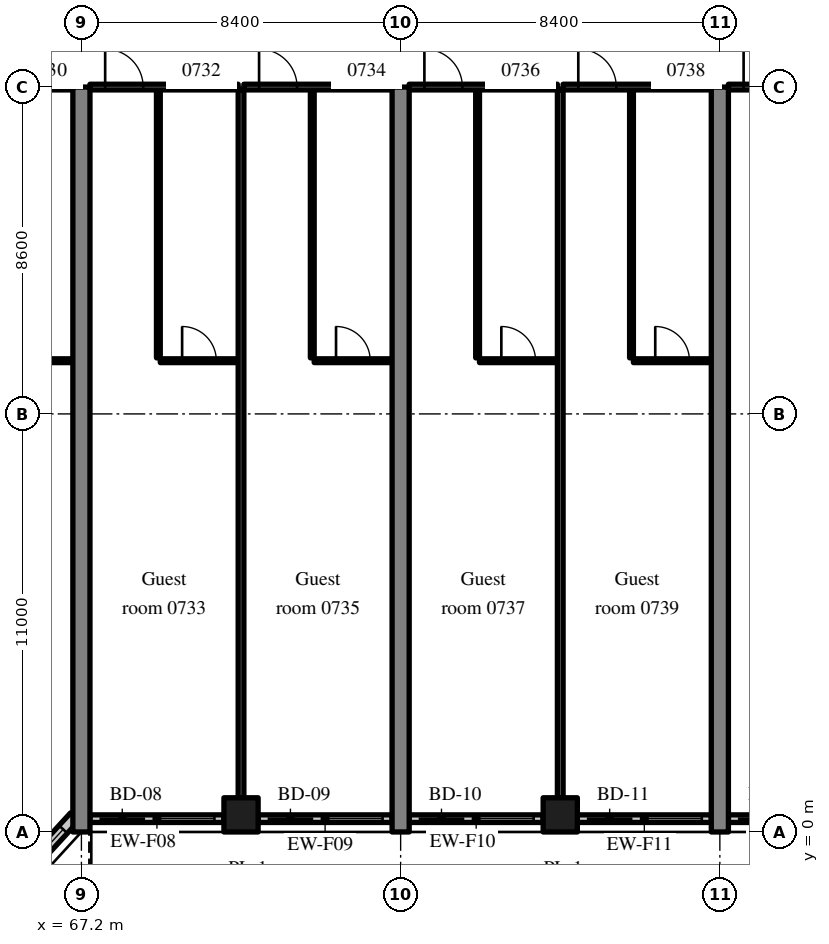
"""IFC4 building model, lengths in metres.
Left out: names, types, materials, properties, quantities, classifications, styles, units other than length and angle.
Written with IfcOpenShell. Run it as: python <this file> out.ifc"""

import sys

from ifc_helpers import new_model, si_unit, direction, frame, frame_2d, origin, origin_2d, place, context, subcontext, project, spatial, rectangle, extrude, source, transform, mapped, element, fill, save


model = new_model("IFC4")
c1 = context("Model", 3, precision=1e-05, world=origin(), true_north=direction((0.0, 1.0)))
c2 = subcontext(c1, "Body", "Model", "MODEL_VIEW")
j1 = project(units=[si_unit("LENGTHUNIT", "METRE"), si_unit("PLANEANGLEUNIT", "RADIAN")], contexts=[c1])
p1 = place(None, origin())
s1 = spatial("IfcSite", under=j1, at=p1, CompositionType="ELEMENT")
p2 = place(p1, origin())
s2 = spatial("IfcBuilding", under=s1, at=p2, CompositionType="ELEMENT")
p3 = place(p2, frame((0.0, 0.0, 35.4)))
s3 = spatial("IfcBuildingStorey", under=s2, at=p3, CompositionType="ELEMENT", Elevation=35.4)
m1 = source(origin(), c2, "Body", "SweptSolid", [
    extrude(rectangle(XDim=19.6, YDim=0.45, at=frame_2d((9.8, 0.0))), origin(), (0.0, 0.0, 1.0), 3.52),
])
for number, where, z_axis, x_axis in (
    (1, (67.2, 0.0, 0.0), (0.0, 0.0, 1.0), (0.0, 1.0, 0.0)),
    (2, (75.6, 0.0, 0.0), (0.0, 0.0, 1.0), (0.0, 1.0, 0.0)),
    (3, (84.0, 0.0, 0.0), (0.0, 0.0, 1.0), (0.0, 1.0, 0.0)),
):
    element("IfcWall", number, at=place(p3, frame(where, z_axis=z_axis, x_axis=x_axis)), inside=s3, PredefinedType="SHEAR", context=c2, shape_type="MappedRepresentation", body=[
        mapped(m1, transform((0.0, 0.0, 0.0), scale=1.0)),
    ])
m2 = source(origin(), c2, "Body", "SweptSolid", [
    extrude(rectangle(XDim=0.9, YDim=0.9, at=origin_2d()), origin(), (0.0, 0.0, 1.0), 3.52),
])
for number, where, z_axis, x_axis in (
    (4, (71.4, 0.45, 0.0), (0.0, 0.0, 1.0), (1.0, 0.0, 0.0)),
    (5, (79.8, 0.45, 0.0), (0.0, 0.0, 1.0), (1.0, 0.0, 0.0)),
):
    element("IfcColumn", number, at=place(p3, frame(where, z_axis=z_axis, x_axis=x_axis)), inside=s3, PredefinedType="COLUMN", context=c2, shape_type="MappedRepresentation", body=[
        mapped(m2, transform((0.0, 0.0, 0.0), scale=1.0)),
    ])
m3 = source(origin(), c2, "Body", "SweptSolid", [
    extrude(rectangle(XDim=2.398, YDim=0.3, at=frame_2d((1.199, 0.0))), origin(), (0.0, 0.0, 1.0), 3.52),
])
p4 = place(p3, frame((65.404, -1.369, 0.0), z_axis=(0.0, 0.0, 1.0), x_axis=(0.675374189419, 0.737475222815, 0.0)))
e6 = element("IfcWall", 6, at=p4, inside=s3, PredefinedType="SOLIDWALL", context=c2, shape_type="MappedRepresentation", body=[
    mapped(m3, transform((0.0, 0.0, 0.0), scale=1.0)),
])
m4 = source(origin(), c2, "Body", "SweptSolid", [
    extrude(rectangle(XDim=1.5, YDim=2.0, at=frame_2d((0.75, 1.0))), frame((0.0, 0.16, 0.0), z_axis=(0.0, -1.0, 0.0), x_axis=(1.0, 0.0, 0.0)), (0.0, 0.0, 1.0), 0.32),
])
p5 = place(p4, frame((0.449, 0.0, 0.9)))
e7 = element("IfcOpeningElement", 7, at=p5, cuts=e6, PredefinedType="OPENING", context=c2, shape_type="MappedRepresentation", body=[
    mapped(m4, transform((0.0, 0.0, 0.0), scale=1.0)),
])
m5 = source(origin(), c2, "Body", "SweptSolid", [
    extrude(rectangle(XDim=3.525, YDim=0.2, at=frame_2d((1.762, 0.0))), origin(), (0.0, 0.0, 1.0), 2.77),
])
p6 = place(p3, frame((67.425, 0.35, 0.0), z_axis=(0.0, 0.0, 1.0), x_axis=(1.0, 0.0, 0.0)))
e8 = element("IfcWall", 8, at=p6, inside=s3, PredefinedType="SOLIDWALL", context=c2, shape_type="MappedRepresentation", body=[
    mapped(m5, transform((0.0, 0.0, 0.0), scale=1.0)),
])
m6 = source(origin(), c2, "Body", "SweptSolid", [
    extrude(rectangle(XDim=1.2, YDim=2.4, at=frame_2d((0.6, 1.2))), frame((0.0, 0.11, 0.0), z_axis=(0.0, -1.0, 0.0), x_axis=(1.0, 0.0, 0.0)), (0.0, 0.0, 1.0), 0.22),
])
p7 = place(p6, frame((0.25, 0.0, 0.0)))
e9 = element("IfcOpeningElement", 9, at=p7, cuts=e8, PredefinedType="OPENING", context=c2, shape_type="MappedRepresentation", body=[
    mapped(m6, transform((0.0, 0.0, 0.0), scale=1.0)),
])
m7 = source(origin(), c2, "Body", "SweptSolid", [
    extrude(rectangle(XDim=1.5, YDim=1.5, at=frame_2d((0.75, 0.75))), frame((0.0, 0.11, 0.0), z_axis=(0.0, -1.0, 0.0), x_axis=(1.0, 0.0, 0.0)), (0.0, 0.0, 1.0), 0.22),
])
p8 = place(p6, frame((1.775, 0.0, 0.9)))
e10 = element("IfcOpeningElement", 10, at=p8, cuts=e8, PredefinedType="OPENING", context=c2, shape_type="MappedRepresentation", body=[
    mapped(m7, transform((0.0, 0.0, 0.0), scale=1.0)),
])
p9 = place(p3, frame((71.85, 0.35, 0.0), z_axis=(0.0, 0.0, 1.0), x_axis=(1.0, 0.0, 0.0)))
e11 = element("IfcWall", 11, at=p9, inside=s3, PredefinedType="SOLIDWALL", context=c2, shape_type="MappedRepresentation", body=[
    mapped(m5, transform((0.0, 0.0, 0.0), scale=1.0)),
])
p10 = place(p9, frame((0.25, 0.0, 0.0)))
e12 = element("IfcOpeningElement", 12, at=p10, cuts=e11, PredefinedType="OPENING", context=c2, shape_type="MappedRepresentation", body=[
    mapped(m6, transform((0.0, 0.0, 0.0), scale=1.0)),
])
p11 = place(p9, frame((1.775, 0.0, 0.9)))
e13 = element("IfcOpeningElement", 13, at=p11, cuts=e11, PredefinedType="OPENING", context=c2, shape_type="MappedRepresentation", body=[
    mapped(m7, transform((0.0, 0.0, 0.0), scale=1.0)),
])
m8 = source(origin(), c2, "Body", "SweptSolid", [
    extrude(rectangle(XDim=3.525, YDim=0.2, at=frame_2d((1.763, 0.0))), origin(), (0.0, 0.0, 1.0), 2.77),
])
p12 = place(p3, frame((75.825, 0.35, 0.0), z_axis=(0.0, 0.0, 1.0), x_axis=(1.0, 0.0, 0.0)))
e14 = element("IfcWall", 14, at=p12, inside=s3, PredefinedType="SOLIDWALL", context=c2, shape_type="MappedRepresentation", body=[
    mapped(m8, transform((0.0, 0.0, 0.0), scale=1.0)),
])
p13 = place(p12, frame((0.25, 0.0, 0.0)))
e15 = element("IfcOpeningElement", 15, at=p13, cuts=e14, PredefinedType="OPENING", context=c2, shape_type="MappedRepresentation", body=[
    mapped(m6, transform((0.0, 0.0, 0.0), scale=1.0)),
])
p14 = place(p12, frame((1.775, 0.0, 0.9)))
e16 = element("IfcOpeningElement", 16, at=p14, cuts=e14, PredefinedType="OPENING", context=c2, shape_type="MappedRepresentation", body=[
    mapped(m7, transform((0.0, 0.0, 0.0), scale=1.0)),
])
p15 = place(p3, frame((80.25, 0.35, 0.0), z_axis=(0.0, 0.0, 1.0), x_axis=(1.0, 0.0, 0.0)))
e17 = element("IfcWall", 17, at=p15, inside=s3, PredefinedType="SOLIDWALL", context=c2, shape_type="MappedRepresentation", body=[
    mapped(m5, transform((0.0, 0.0, 0.0), scale=1.0)),
])
p16 = place(p15, frame((0.25, 0.0, 0.0)))
e18 = element("IfcOpeningElement", 18, at=p16, cuts=e17, PredefinedType="OPENING", context=c2, shape_type="MappedRepresentation", body=[
    mapped(m6, transform((0.0, 0.0, 0.0), scale=1.0)),
])
p17 = place(p15, frame((1.775, 0.0, 0.9)))
e19 = element("IfcOpeningElement", 19, at=p17, cuts=e17, PredefinedType="OPENING", context=c2, shape_type="MappedRepresentation", body=[
    mapped(m7, transform((0.0, 0.0, 0.0), scale=1.0)),
])
p18 = place(p3, frame((84.225, 0.35, 0.0), z_axis=(0.0, 0.0, 1.0), x_axis=(1.0, 0.0, 0.0)))
e20 = element("IfcWall", 20, at=p18, inside=s3, PredefinedType="SOLIDWALL", context=c2, shape_type="MappedRepresentation", body=[
    mapped(m5, transform((0.0, 0.0, 0.0), scale=1.0)),
])
p19 = place(p18, frame((0.25, 0.0, 0.0)))
e21 = element("IfcOpeningElement", 21, at=p19, cuts=e20, PredefinedType="OPENING", context=c2, shape_type="MappedRepresentation", body=[
    mapped(m6, transform((0.0, 0.0, 0.0), scale=1.0)),
])
p20 = place(p18, frame((1.775, 0.0, 0.9)))
e22 = element("IfcOpeningElement", 22, at=p20, cuts=e20, PredefinedType="OPENING", context=c2, shape_type="MappedRepresentation", body=[
    mapped(m7, transform((0.0, 0.0, 0.0), scale=1.0)),
])
m9 = source(origin(), c2, "Body", "SweptSolid", [
    extrude(rectangle(XDim=2.05, YDim=0.1, at=frame_2d((1.025, 0.0))), origin(), (0.0, 0.0, 1.0), 3.52),
])
p21 = place(p3, frame((64.925, 12.4, 0.0), z_axis=(0.0, 0.0, 1.0), x_axis=(1.0, 0.0, 0.0)))
e23 = element("IfcWall", 23, at=p21, inside=s3, PredefinedType="PARTITIONING", context=c2, shape_type="MappedRepresentation", body=[
    mapped(m9, transform((0.0, 0.0, 0.0), scale=1.0)),
])
m10 = source(origin(), c2, "Body", "SweptSolid", [
    extrude(rectangle(XDim=0.9, YDim=2.1, at=frame_2d((0.45, 1.05))), frame((0.0, 0.06, 0.0), z_axis=(0.0, -1.0, 0.0), x_axis=(1.0, 0.0, 0.0)), (0.0, 0.0, 1.0), 0.12),
])
p22 = place(p21, frame((0.575, 0.0, 0.0)))
e24 = element("IfcOpeningElement", 24, at=p22, cuts=e23, PredefinedType="OPENING", context=c2, shape_type="MappedRepresentation", body=[
    mapped(m10, transform((0.0, 0.0, 0.0), scale=1.0)),
])
m11 = source(origin(), c2, "Body", "SweptSolid", [
    extrude(rectangle(XDim=3.9, YDim=0.15, at=frame_2d((1.95, 0.0))), origin(), (0.0, 0.0, 1.0), 2.82),
])
p23 = place(p3, frame((63.075, 19.6, 0.0), z_axis=(0.0, 0.0, 1.0), x_axis=(1.0, 0.0, 0.0)))
e25 = element("IfcWall", 25, at=p23, inside=s3, PredefinedType="PARTITIONING", context=c2, shape_type="MappedRepresentation", body=[
    mapped(m11, transform((0.0, 0.0, 0.0), scale=1.0)),
])
m12 = source(origin(), c2, "Body", "SweptSolid", [
    extrude(rectangle(XDim=1.0, YDim=2.1, at=frame_2d((0.5, 1.05))), frame((0.0, 0.085, 0.0), z_axis=(0.0, -1.0, 0.0), x_axis=(1.0, 0.0, 0.0)), (0.0, 0.0, 1.0), 0.17),
])
p24 = place(p23, frame((0.4, 0.0, 0.0)))
e26 = element("IfcOpeningElement", 26, at=p24, cuts=e25, PredefinedType="OPENING", context=c2, shape_type="MappedRepresentation", body=[
    mapped(m12, transform((0.0, 0.0, 0.0), scale=1.0)),
])
m13 = source(origin(), c2, "Body", "SweptSolid", [
    extrude(rectangle(XDim=7.05, YDim=0.1, at=frame_2d((3.525, 0.0))), origin(), (0.0, 0.0, 1.0), 3.52),
])
p25 = place(p3, frame((69.225, 12.475, 0.0), z_axis=(0.0, 0.0, 1.0), x_axis=(0.0, 1.0, 0.0)))
e27 = element("IfcWall", 27, at=p25, inside=s3, PredefinedType="PARTITIONING", context=c2, shape_type="MappedRepresentation", body=[
    mapped(m13, transform((0.0, 0.0, 0.0), scale=1.0)),
])
p26 = place(p3, frame((69.275, 12.4, 0.0), z_axis=(0.0, 0.0, 1.0), x_axis=(1.0, 0.0, 0.0)))
e28 = element("IfcWall", 28, at=p26, inside=s3, PredefinedType="PARTITIONING", context=c2, shape_type="MappedRepresentation", body=[
    mapped(m9, transform((0.0, 0.0, 0.0), scale=1.0)),
])
p27 = place(p26, frame((0.575, 0.0, 0.0)))
e29 = element("IfcOpeningElement", 29, at=p27, cuts=e28, PredefinedType="OPENING", context=c2, shape_type="MappedRepresentation", body=[
    mapped(m10, transform((0.0, 0.0, 0.0), scale=1.0)),
])
m14 = source(origin(), c2, "Body", "SweptSolid", [
    extrude(rectangle(XDim=3.9, YDim=0.15, at=frame_2d((1.95, 0.0))), origin(), (0.0, 0.0, 1.0), 2.82),
])
p28 = place(p3, frame((67.425, 19.6, 0.0), z_axis=(0.0, 0.0, 1.0), x_axis=(1.0, 0.0, 0.0)))
e30 = element("IfcWall", 30, at=p28, inside=s3, PredefinedType="PARTITIONING", context=c2, shape_type="MappedRepresentation", body=[
    mapped(m14, transform((0.0, 0.0, 0.0), scale=1.0)),
])
p29 = place(p28, frame((0.4, 0.0, 0.0)))
e31 = element("IfcOpeningElement", 31, at=p29, cuts=e30, PredefinedType="OPENING", context=c2, shape_type="MappedRepresentation", body=[
    mapped(m12, transform((0.0, 0.0, 0.0), scale=1.0)),
])
p30 = place(p3, frame((73.275, 12.475, 0.0), z_axis=(0.0, 0.0, 1.0), x_axis=(0.0, 1.0, 0.0)))
e32 = element("IfcWall", 32, at=p30, inside=s3, PredefinedType="PARTITIONING", context=c2, shape_type="MappedRepresentation", body=[
    mapped(m13, transform((0.0, 0.0, 0.0), scale=1.0)),
])
p31 = place(p3, frame((73.325, 12.4, 0.0), z_axis=(0.0, 0.0, 1.0), x_axis=(1.0, 0.0, 0.0)))
e33 = element("IfcWall", 33, at=p31, inside=s3, PredefinedType="PARTITIONING", context=c2, shape_type="MappedRepresentation", body=[
    mapped(m9, transform((0.0, 0.0, 0.0), scale=1.0)),
])
p32 = place(p31, frame((0.575, 0.0, 0.0)))
e34 = element("IfcOpeningElement", 34, at=p32, cuts=e33, PredefinedType="OPENING", context=c2, shape_type="MappedRepresentation", body=[
    mapped(m10, transform((0.0, 0.0, 0.0), scale=1.0)),
])
p33 = place(p3, frame((71.475, 19.6, 0.0), z_axis=(0.0, 0.0, 1.0), x_axis=(1.0, 0.0, 0.0)))
e35 = element("IfcWall", 35, at=p33, inside=s3, PredefinedType="PARTITIONING", context=c2, shape_type="MappedRepresentation", body=[
    mapped(m14, transform((0.0, 0.0, 0.0), scale=1.0)),
])
p34 = place(p33, frame((0.4, 0.0, 0.0)))
e36 = element("IfcOpeningElement", 36, at=p34, cuts=e35, PredefinedType="OPENING", context=c2, shape_type="MappedRepresentation", body=[
    mapped(m12, transform((0.0, 0.0, 0.0), scale=1.0)),
])
m15 = source(origin(), c2, "Body", "SweptSolid", [
    extrude(rectangle(XDim=18.625, YDim=0.15, at=frame_2d((9.312, 0.0))), origin(), (0.0, 0.0, 1.0), 3.52),
])
p35 = place(p3, frame((71.4, 0.9, 0.0), z_axis=(0.0, 0.0, 1.0), x_axis=(0.0, 1.0, 0.0)))
e37 = element("IfcWall", 37, at=p35, inside=s3, PredefinedType="PARTITIONING", context=c2, shape_type="MappedRepresentation", body=[
    mapped(m15, transform((0.0, 0.0, 0.0), scale=1.0)),
])
p36 = place(p3, frame((77.625, 12.475, 0.0), z_axis=(0.0, 0.0, 1.0), x_axis=(0.0, 1.0, 0.0)))
e38 = element("IfcWall", 38, at=p36, inside=s3, PredefinedType="PARTITIONING", context=c2, shape_type="MappedRepresentation", body=[
    mapped(m13, transform((0.0, 0.0, 0.0), scale=1.0)),
])
p37 = place(p3, frame((77.675, 12.4, 0.0), z_axis=(0.0, 0.0, 1.0), x_axis=(1.0, 0.0, 0.0)))
e39 = element("IfcWall", 39, at=p37, inside=s3, PredefinedType="PARTITIONING", context=c2, shape_type="MappedRepresentation", body=[
    mapped(m9, transform((0.0, 0.0, 0.0), scale=1.0)),
])
p38 = place(p37, frame((0.575, 0.0, 0.0)))
e40 = element("IfcOpeningElement", 40, at=p38, cuts=e39, PredefinedType="OPENING", context=c2, shape_type="MappedRepresentation", body=[
    mapped(m10, transform((0.0, 0.0, 0.0), scale=1.0)),
])
p39 = place(p3, frame((75.825, 19.6, 0.0), z_axis=(0.0, 0.0, 1.0), x_axis=(1.0, 0.0, 0.0)))
e41 = element("IfcWall", 41, at=p39, inside=s3, PredefinedType="PARTITIONING", context=c2, shape_type="MappedRepresentation", body=[
    mapped(m11, transform((0.0, 0.0, 0.0), scale=1.0)),
])
p40 = place(p39, frame((0.4, 0.0, 0.0)))
e42 = element("IfcOpeningElement", 42, at=p40, cuts=e41, PredefinedType="OPENING", context=c2, shape_type="MappedRepresentation", body=[
    mapped(m12, transform((0.0, 0.0, 0.0), scale=1.0)),
])
p41 = place(p3, frame((81.675, 12.475, 0.0), z_axis=(0.0, 0.0, 1.0), x_axis=(0.0, 1.0, 0.0)))
e43 = element("IfcWall", 43, at=p41, inside=s3, PredefinedType="PARTITIONING", context=c2, shape_type="MappedRepresentation", body=[
    mapped(m13, transform((0.0, 0.0, 0.0), scale=1.0)),
])
m16 = source(origin(), c2, "Body", "SweptSolid", [
    extrude(rectangle(XDim=2.05, YDim=0.1, at=frame_2d((1.025, 0.0))), origin(), (0.0, 0.0, 1.0), 3.52),
])
p42 = place(p3, frame((81.725, 12.4, 0.0), z_axis=(0.0, 0.0, 1.0), x_axis=(1.0, 0.0, 0.0)))
e44 = element("IfcWall", 44, at=p42, inside=s3, PredefinedType="PARTITIONING", context=c2, shape_type="MappedRepresentation", body=[
    mapped(m16, transform((0.0, 0.0, 0.0), scale=1.0)),
])
p43 = place(p42, frame((0.575, 0.0, 0.0)))
e45 = element("IfcOpeningElement", 45, at=p43, cuts=e44, PredefinedType="OPENING", context=c2, shape_type="MappedRepresentation", body=[
    mapped(m10, transform((0.0, 0.0, 0.0), scale=1.0)),
])
p44 = place(p3, frame((79.875, 19.6, 0.0), z_axis=(0.0, 0.0, 1.0), x_axis=(1.0, 0.0, 0.0)))
e46 = element("IfcWall", 46, at=p44, inside=s3, PredefinedType="PARTITIONING", context=c2, shape_type="MappedRepresentation", body=[
    mapped(m14, transform((0.0, 0.0, 0.0), scale=1.0)),
])
p45 = place(p44, frame((0.4, 0.0, 0.0)))
e47 = element("IfcOpeningElement", 47, at=p45, cuts=e46, PredefinedType="OPENING", context=c2, shape_type="MappedRepresentation", body=[
    mapped(m12, transform((0.0, 0.0, 0.0), scale=1.0)),
])
p46 = place(p3, frame((79.8, 0.9, 0.0), z_axis=(0.0, 0.0, 1.0), x_axis=(0.0, 1.0, 0.0)))
e48 = element("IfcWall", 48, at=p46, inside=s3, PredefinedType="PARTITIONING", context=c2, shape_type="MappedRepresentation", body=[
    mapped(m15, transform((0.0, 0.0, 0.0), scale=1.0)),
])
p47 = place(p3, frame((84.225, 19.6, 0.0), z_axis=(0.0, 0.0, 1.0), x_axis=(1.0, 0.0, 0.0)))
e49 = element("IfcWall", 49, at=p47, inside=s3, PredefinedType="PARTITIONING", context=c2, shape_type="MappedRepresentation", body=[
    mapped(m14, transform((0.0, 0.0, 0.0), scale=1.0)),
])
p48 = place(p47, frame((0.4, 0.0, 0.0)))
e50 = element("IfcOpeningElement", 50, at=p48, cuts=e49, PredefinedType="OPENING", context=c2, shape_type="MappedRepresentation", body=[
    mapped(m12, transform((0.0, 0.0, 0.0), scale=1.0)),
])
m17 = source(origin(), c2, "Body", "SweptSolid", [
    extrude(rectangle(XDim=1.5, YDim=2.0, at=frame_2d((0.75, 1.0))), frame((0.0, 0.03, 0.0), z_axis=(0.0, -1.0, 0.0), x_axis=(1.0, 0.0, 0.0)), (0.0, 0.0, 1.0), 0.06),
])
p49 = place(p5, origin())
e51 = element("IfcWindow", 51, at=p49, inside=s3, PartitioningType="SINGLE_PANEL", PredefinedType="WINDOW", context=c2, shape_type="MappedRepresentation", body=[
    mapped(m17, transform((0.0, 0.0, 0.0), scale=1.0)),
])
fill(e7, e51)
m18 = source(origin(), c2, "Body", "SweptSolid", [
    extrude(rectangle(XDim=1.2, YDim=2.4, at=frame_2d((0.6, 1.2))), frame((0.0, 0.025, 0.0), z_axis=(0.0, -1.0, 0.0), x_axis=(1.0, 0.0, 0.0)), (0.0, 0.0, 1.0), 0.05),
])
p50 = place(p7, origin())
e52 = element("IfcDoor", 52, at=p50, inside=s3, OperationType="SLIDING_TO_RIGHT", PredefinedType="DOOR", context=c2, shape_type="MappedRepresentation", body=[
    mapped(m18, transform((0.0, 0.0, 0.0), scale=1.0)),
])
fill(e9, e52)
m19 = source(origin(), c2, "Body", "SweptSolid", [
    extrude(rectangle(XDim=1.5, YDim=1.5, at=frame_2d((0.75, 0.75))), frame((0.0, 0.03, 0.0), z_axis=(0.0, -1.0, 0.0), x_axis=(1.0, 0.0, 0.0)), (0.0, 0.0, 1.0), 0.06),
])
p51 = place(p8, origin())
e53 = element("IfcWindow", 53, at=p51, inside=s3, PartitioningType="SINGLE_PANEL", PredefinedType="WINDOW", context=c2, shape_type="MappedRepresentation", body=[
    mapped(m19, transform((0.0, 0.0, 0.0), scale=1.0)),
])
fill(e10, e53)
p52 = place(p10, origin())
e54 = element("IfcDoor", 54, at=p52, inside=s3, OperationType="SLIDING_TO_LEFT", PredefinedType="DOOR", context=c2, shape_type="MappedRepresentation", body=[
    mapped(m18, transform((0.0, 0.0, 0.0), scale=1.0)),
])
fill(e12, e54)
p53 = place(p11, origin())
e55 = element("IfcWindow", 55, at=p53, inside=s3, PartitioningType="SINGLE_PANEL", PredefinedType="WINDOW", context=c2, shape_type="MappedRepresentation", body=[
    mapped(m19, transform((0.0, 0.0, 0.0), scale=1.0)),
])
fill(e13, e55)
p54 = place(p13, origin())
e56 = element("IfcDoor", 56, at=p54, inside=s3, OperationType="SLIDING_TO_RIGHT", PredefinedType="DOOR", context=c2, shape_type="MappedRepresentation", body=[
    mapped(m18, transform((0.0, 0.0, 0.0), scale=1.0)),
])
fill(e15, e56)
p55 = place(p14, origin())
e57 = element("IfcWindow", 57, at=p55, inside=s3, PartitioningType="SINGLE_PANEL", PredefinedType="WINDOW", context=c2, shape_type="MappedRepresentation", body=[
    mapped(m19, transform((0.0, 0.0, 0.0), scale=1.0)),
])
fill(e16, e57)
p56 = place(p16, origin())
e58 = element("IfcDoor", 58, at=p56, inside=s3, OperationType="SLIDING_TO_LEFT", PredefinedType="DOOR", context=c2, shape_type="MappedRepresentation", body=[
    mapped(m18, transform((0.0, 0.0, 0.0), scale=1.0)),
])
fill(e18, e58)
p57 = place(p17, origin())
e59 = element("IfcWindow", 59, at=p57, inside=s3, PartitioningType="SINGLE_PANEL", PredefinedType="WINDOW", context=c2, shape_type="MappedRepresentation", body=[
    mapped(m19, transform((0.0, 0.0, 0.0), scale=1.0)),
])
fill(e19, e59)
p58 = place(p19, origin())
e60 = element("IfcDoor", 60, at=p58, inside=s3, OperationType="SLIDING_TO_RIGHT", PredefinedType="DOOR", context=c2, shape_type="MappedRepresentation", body=[
    mapped(m18, transform((0.0, 0.0, 0.0), scale=1.0)),
])
fill(e21, e60)
m20 = source(origin(), c2, "Body", "SweptSolid", [
    extrude(rectangle(XDim=0.9, YDim=2.1, at=frame_2d((0.45, 1.05))), frame((0.0, 0.025, 0.0), z_axis=(0.0, -1.0, 0.0), x_axis=(1.0, 0.0, 0.0)), (0.0, 0.0, 1.0), 0.05),
])
p59 = place(p27, origin())
e61 = element("IfcDoor", 61, at=p59, inside=s3, OperationType="SINGLE_SWING_LEFT", PredefinedType="DOOR", context=c2, shape_type="MappedRepresentation", body=[
    mapped(m20, transform((0.0, 0.0, 0.0), scale=1.0)),
])
fill(e29, e61)
m21 = source(origin(), c2, "Body", "SweptSolid", [
    extrude(rectangle(XDim=1.0, YDim=2.1, at=frame_2d((0.5, 1.05))), frame((0.0, 0.025, 0.0), z_axis=(0.0, -1.0, 0.0), x_axis=(1.0, 0.0, 0.0)), (0.0, 0.0, 1.0), 0.05),
])
p60 = place(p29, origin())
e62 = element("IfcDoor", 62, at=p60, inside=s3, OperationType="SINGLE_SWING_LEFT", PredefinedType="DOOR", context=c2, shape_type="MappedRepresentation", body=[
    mapped(m21, transform((0.0, 0.0, 0.0), scale=1.0)),
])
fill(e31, e62)
p61 = place(p32, origin())
e63 = element("IfcDoor", 63, at=p61, inside=s3, OperationType="SINGLE_SWING_LEFT", PredefinedType="DOOR", context=c2, shape_type="MappedRepresentation", body=[
    mapped(m20, transform((0.0, 0.0, 0.0), scale=1.0)),
])
fill(e34, e63)
p62 = place(p34, origin())
e64 = element("IfcDoor", 64, at=p62, inside=s3, OperationType="SINGLE_SWING_LEFT", PredefinedType="DOOR", context=c2, shape_type="MappedRepresentation", body=[
    mapped(m21, transform((0.0, 0.0, 0.0), scale=1.0)),
])
fill(e36, e64)
p63 = place(p38, origin())
e65 = element("IfcDoor", 65, at=p63, inside=s3, OperationType="SINGLE_SWING_LEFT", PredefinedType="DOOR", context=c2, shape_type="MappedRepresentation", body=[
    mapped(m20, transform((0.0, 0.0, 0.0), scale=1.0)),
])
fill(e40, e65)
p64 = place(p40, origin())
e66 = element("IfcDoor", 66, at=p64, inside=s3, OperationType="SINGLE_SWING_LEFT", PredefinedType="DOOR", context=c2, shape_type="MappedRepresentation", body=[
    mapped(m21, transform((0.0, 0.0, 0.0), scale=1.0)),
])
fill(e42, e66)
p65 = place(p43, origin())
e67 = element("IfcDoor", 67, at=p65, inside=s3, OperationType="SINGLE_SWING_LEFT", PredefinedType="DOOR", context=c2, shape_type="MappedRepresentation", body=[
    mapped(m20, transform((0.0, 0.0, 0.0), scale=1.0)),
])
fill(e45, e67)
p66 = place(p45, origin())
e68 = element("IfcDoor", 68, at=p66, inside=s3, OperationType="SINGLE_SWING_LEFT", PredefinedType="DOOR", context=c2, shape_type="MappedRepresentation", body=[
    mapped(m21, transform((0.0, 0.0, 0.0), scale=1.0)),
])
fill(e47, e68)
p67 = place(p48, origin())
e69 = element("IfcDoor", 69, at=p67, inside=s3, OperationType="SINGLE_SWING_LEFT", PredefinedType="DOOR", context=c2, shape_type="MappedRepresentation", body=[
    mapped(m21, transform((0.0, 0.0, 0.0), scale=1.0)),
])
fill(e50, e69)
save(model, sys.argv[1])
